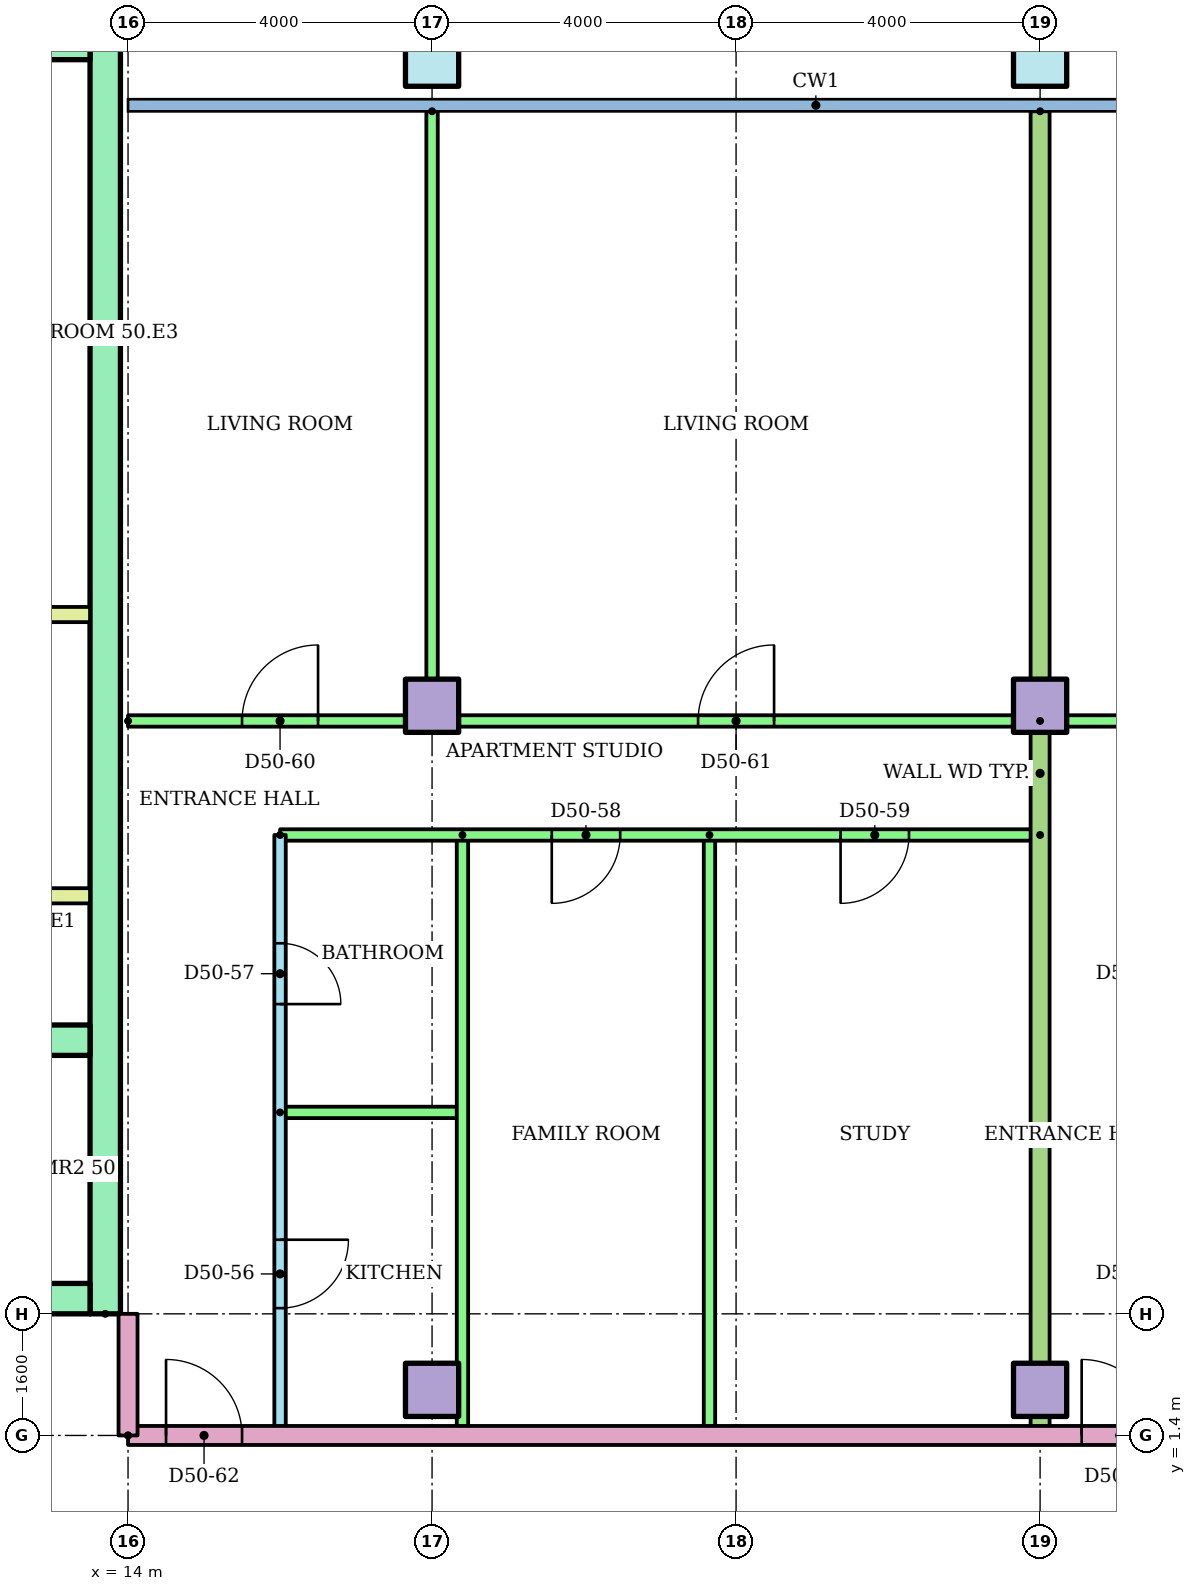
"""IFC4 building model, lengths in metres.
Left out: names, types, materials, properties, quantities, classifications, styles, units other than length and angle.
Written with IfcOpenShell. Run it as: python <this file> out.ifc"""

import sys

from ifc_helpers import new_model, si_unit, direction, frame, frame_2d, origin, origin_2d, place, context, subcontext, project, spatial, rectangle, hollow_rectangle, extrude, element, fill, save


model = new_model("IFC4")
c1 = context("Model", 3, precision=1e-05, world=origin(), true_north=direction((0.0, 1.0)))
c2 = subcontext(c1, "Body", "Model", "MODEL_VIEW")
j1 = project(units=[si_unit("LENGTHUNIT", "METRE"), si_unit("PLANEANGLEUNIT", "RADIAN")], contexts=[c1])
p1 = place(None, origin())
s1 = spatial("IfcSite", under=j1, at=p1, CompositionType="ELEMENT")
p2 = place(p1, origin())
s2 = spatial("IfcBuilding", under=s1, at=p2, CompositionType="ELEMENT")
p3 = place(p2, frame((0.0, 0.0, 190.9)))
s3 = spatial("IfcBuildingStorey", under=s2, at=p3, CompositionType="ELEMENT", Elevation=190.9)
for number, where in (
    (1, (18.0, 2.0, 0.0)),
    (2, (26.0, 2.0, 0.0)),
    (3, (18.0, 11.0, 0.0)),
    (4, (26.0, 11.0, 0.0)),
):
    element("IfcColumn", number, at=place(p3, frame(where)), inside=s3, PredefinedType="COLUMN", context=c2, shape_type="SweptSolid", body=[
        extrude(rectangle(XDim=0.7, YDim=0.7, at=origin_2d()), origin(), (0.0, 0.0, 1.0), 3.2),
    ])
for number, where in (
    (5, (18.0, 19.5, 0.0)),
    (6, (26.0, 19.5, 0.0)),
):
    element("IfcColumn", number, at=place(p3, frame(where)), inside=s3, PredefinedType="COLUMN", context=c2, shape_type="SweptSolid", body=[
        extrude(hollow_rectangle(XDim=0.7, YDim=0.7, WallThickness=0.036, at=origin_2d()), origin(), (0.0, 0.0, 1.0), 3.2),
    ])
p4 = place(p3, frame((13.7, 3.0, 0.0), z_axis=(0.0, 0.0, 1.0), x_axis=(0.0, 1.0, 0.0)))
e7 = element("IfcWall", 7, at=p4, inside=s3, PredefinedType="SHEAR", context=c2, shape_type="SweptSolid", body=[
    extrude(rectangle(XDim=17.0, YDim=0.4, at=frame_2d((8.5, 0.0))), origin(), (0.0, 0.0, 1.0), 2.8),
])
p5 = place(p3, frame((-13.5, 19.7, 0.0)))
e8 = element("IfcWall", 8, at=p5, inside=s3, PredefinedType="SHEAR", context=c2, shape_type="SweptSolid", body=[
    extrude(rectangle(XDim=27.0, YDim=0.4, at=frame_2d((13.5, 0.0))), origin(), (0.0, 0.0, 1.0), 2.8),
])
p6 = place(p3, frame((-13.5, 3.2, 0.0)))
e9 = element("IfcWall", 9, at=p6, inside=s3, PredefinedType="SHEAR", context=c2, shape_type="SweptSolid", body=[
    extrude(rectangle(XDim=27.0, YDim=0.4, at=frame_2d((13.5, 0.0))), origin(), (0.0, 0.0, 1.0), 2.8),
])
p7 = place(p6, frame((22.083, 0.0, 0.0)))
e10 = element("IfcOpeningElement", 10, at=p7, cuts=e9, PredefinedType="OPENING", context=c2, shape_type="SweptSolid", body=[
    extrude(rectangle(XDim=1.1, YDim=2.1, at=frame_2d((0.55, 1.05))), frame((0.0, 0.21, 0.0), z_axis=(0.0, -1.0, 0.0), x_axis=(1.0, 0.0, 0.0)), (0.0, 0.0, 1.0), 0.42),
])
p8 = place(p6, frame((25.128, 0.0, 0.0)))
e11 = element("IfcOpeningElement", 11, at=p8, cuts=e9, PredefinedType="OPENING", context=c2, shape_type="SweptSolid", body=[
    extrude(rectangle(XDim=1.1, YDim=2.1, at=frame_2d((0.55, 1.05))), frame((0.0, 0.21, 0.0), z_axis=(0.0, -1.0, 0.0), x_axis=(1.0, 0.0, 0.0)), (0.0, 0.0, 1.0), 0.42),
])
p9 = place(p6, frame((12.6, 0.0, 0.0)))
e12 = element("IfcOpeningElement", 12, at=p9, cuts=e9, PredefinedType="OPENING", context=c2, shape_type="SweptSolid", body=[
    extrude(rectangle(XDim=1.8, YDim=2.1, at=frame_2d((0.9, 1.05))), frame((0.0, 0.21, 0.0), z_axis=(0.0, -1.0, 0.0), x_axis=(1.0, 0.0, 0.0)), (0.0, 0.0, 1.0), 0.42),
])
p10 = place(p3, frame((1.522, 6.6, 0.0)))
e13 = element("IfcWall", 13, at=p10, inside=s3, PredefinedType="SHEAR", context=c2, shape_type="SweptSolid", body=[
    extrude(rectangle(XDim=11.978, YDim=0.4, at=frame_2d((5.989, 0.0))), origin(), (0.0, 0.0, 1.0), 2.8),
])
p11 = place(p10, frame((1.022, 0.0, 0.0)))
e14 = element("IfcOpeningElement", 14, at=p11, cuts=e13, PredefinedType="OPENING", context=c2, shape_type="SweptSolid", body=[
    extrude(rectangle(XDim=1.0, YDim=2.1, at=frame_2d((0.5, 1.05))), frame((0.0, 0.21, 0.0), z_axis=(0.0, -1.0, 0.0), x_axis=(1.0, 0.0, 0.0)), (0.0, 0.0, 1.0), 0.42),
])
p12 = place(p10, frame((4.067, 0.0, 0.0)))
e15 = element("IfcOpeningElement", 15, at=p12, cuts=e13, PredefinedType="OPENING", context=c2, shape_type="SweptSolid", body=[
    extrude(rectangle(XDim=1.0, YDim=2.1, at=frame_2d((0.5, 1.05))), frame((0.0, 0.21, 0.0), z_axis=(0.0, -1.0, 0.0), x_axis=(1.0, 0.0, 0.0)), (0.0, 0.0, 1.0), 0.42),
])
for number, where in (
    (16, (9.6, 8.5, 0.0)),
    (17, (9.6, 12.2, 0.0)),
):
    element("IfcWall", number, at=place(p3, frame(where)), inside=s3, PredefinedType="PARTITIONING", context=c2, shape_type="SweptSolid", body=[
        extrude(rectangle(XDim=3.9, YDim=0.2, at=frame_2d((1.95, 0.0))), origin(), (0.0, 0.0, 1.0), 2.8),
    ])
p13 = place(p3, frame((16.0, 9.3, 0.0), z_axis=(0.0, 0.0, 1.0), x_axis=(0.0, -1.0, 0.0)))
e18 = element("IfcWall", 18, at=p13, inside=s3, PredefinedType="PARTITIONING", context=c2, shape_type="SweptSolid", body=[
    extrude(rectangle(XDim=7.9, YDim=0.15, at=frame_2d((3.95, 0.0))), origin(), (0.0, 0.0, 1.0), 2.4),
])
p14 = place(p13, frame((5.325, 0.0, 0.0)))
e19 = element("IfcOpeningElement", 19, at=p14, cuts=e18, PredefinedType="OPENING", context=c2, shape_type="SweptSolid", body=[
    extrude(rectangle(XDim=0.9, YDim=2.1, at=frame_2d((0.45, 1.05))), frame((0.0, 0.085, 0.0), z_axis=(0.0, -1.0, 0.0), x_axis=(1.0, 0.0, 0.0)), (0.0, 0.0, 1.0), 0.17),
])
p15 = place(p13, frame((1.425, 0.0, 0.0)))
e20 = element("IfcOpeningElement", 20, at=p15, cuts=e18, PredefinedType="OPENING", context=c2, shape_type="SweptSolid", body=[
    extrude(rectangle(XDim=0.8, YDim=2.1, at=frame_2d((0.4, 1.05))), frame((0.0, 0.085, 0.0), z_axis=(0.0, -1.0, 0.0), x_axis=(1.0, 0.0, 0.0)), (0.0, 0.0, 1.0), 0.17),
])
p16 = place(p3, frame((16.0, 5.65, 0.0)))
e21 = element("IfcWall", 21, at=p16, inside=s3, PredefinedType="PARTITIONING", context=c2, shape_type="SweptSolid", body=[
    extrude(rectangle(XDim=2.4, YDim=0.15, at=frame_2d((1.2, 0.0))), origin(), (0.0, 0.0, 1.0), 2.4),
])
for number, where, z_axis, x_axis in (
    (22, (18.4, 9.3, 0.0), (0.0, 0.0, 1.0), (0.0, -1.0, 0.0)),
    (23, (21.65, 9.3, 0.0), (0.0, 0.0, 1.0), (0.0, -1.0, 0.0)),
):
    element("IfcWall", number, at=place(p3, frame(where, z_axis=z_axis, x_axis=x_axis)), inside=s3, PredefinedType="PARTITIONING", context=c2, shape_type="SweptSolid", body=[
        extrude(rectangle(XDim=7.9, YDim=0.15, at=frame_2d((3.95, 0.0))), origin(), (0.0, 0.0, 1.0), 2.4),
    ])
p17 = place(p3, frame((26.0, 9.3, 0.0), z_axis=(0.0, 0.0, 1.0), x_axis=(-1.0, 0.0, 0.0)))
e24 = element("IfcWall", 24, at=p17, inside=s3, PredefinedType="PARTITIONING", context=c2, shape_type="SweptSolid", body=[
    extrude(rectangle(XDim=10.0, YDim=0.15, at=frame_2d((5.0, 0.0))), origin(), (0.0, 0.0, 1.0), 2.4),
])
p18 = place(p17, frame((5.525, 0.0, 0.0)))
e25 = element("IfcOpeningElement", 25, at=p18, cuts=e24, PredefinedType="OPENING", context=c2, shape_type="SweptSolid", body=[
    extrude(rectangle(XDim=0.9, YDim=2.1, at=frame_2d((0.45, 1.05))), frame((0.0, 0.085, 0.0), z_axis=(0.0, -1.0, 0.0), x_axis=(1.0, 0.0, 0.0)), (0.0, 0.0, 1.0), 0.17),
])
p19 = place(p17, frame((1.725, 0.0, 0.0)))
e26 = element("IfcOpeningElement", 26, at=p19, cuts=e24, PredefinedType="OPENING", context=c2, shape_type="SweptSolid", body=[
    extrude(rectangle(XDim=0.9, YDim=2.1, at=frame_2d((0.45, 1.05))), frame((0.0, 0.085, 0.0), z_axis=(0.0, -1.0, 0.0), x_axis=(1.0, 0.0, 0.0)), (0.0, 0.0, 1.0), 0.17),
])
p20 = place(p3, frame((14.0, 10.8, 0.0)))
e27 = element("IfcWall", 27, at=p20, inside=s3, PredefinedType="PARTITIONING", context=c2, shape_type="SweptSolid", body=[
    extrude(rectangle(XDim=12.0, YDim=0.15, at=frame_2d((6.0, 0.0))), origin(), (0.0, 0.0, 1.0), 2.4),
])
p21 = place(p20, frame((1.5, 0.0, 0.0)))
e28 = element("IfcOpeningElement", 28, at=p21, cuts=e27, PredefinedType="OPENING", context=c2, shape_type="SweptSolid", body=[
    extrude(rectangle(XDim=1.0, YDim=2.1, at=frame_2d((0.5, 1.05))), frame((0.0, 0.085, 0.0), z_axis=(0.0, -1.0, 0.0), x_axis=(1.0, 0.0, 0.0)), (0.0, 0.0, 1.0), 0.17),
])
p22 = place(p20, frame((7.5, 0.0, 0.0)))
e29 = element("IfcOpeningElement", 29, at=p22, cuts=e27, PredefinedType="OPENING", context=c2, shape_type="SweptSolid", body=[
    extrude(rectangle(XDim=1.0, YDim=2.1, at=frame_2d((0.5, 1.05))), frame((0.0, 0.085, 0.0), z_axis=(0.0, -1.0, 0.0), x_axis=(1.0, 0.0, 0.0)), (0.0, 0.0, 1.0), 0.17),
])
p23 = place(p3, frame((18.0, 18.821, 0.0), z_axis=(0.0, 0.0, 1.0), x_axis=(0.0, -1.0, 0.0)))
e30 = element("IfcWall", 30, at=p23, inside=s3, PredefinedType="PARTITIONING", context=c2, shape_type="SweptSolid", body=[
    extrude(rectangle(XDim=8.021, YDim=0.15, at=frame_2d((4.01, 0.0))), origin(), (0.0, 0.0, 1.0), 2.4),
])
p24 = place(p3, frame((26.0, 10.8, 0.0)))
e31 = element("IfcWall", 31, at=p24, inside=s3, PredefinedType="PARTITIONING", context=c2, shape_type="SweptSolid", body=[
    extrude(rectangle(XDim=10.81, YDim=0.15, at=frame_2d((5.405, 0.0))), origin(), (0.0, 0.0, 1.0), 2.4),
])
p25 = place(p24, frame((2.55, 0.0, 0.0)))
e32 = element("IfcOpeningElement", 32, at=p25, cuts=e31, PredefinedType="OPENING", context=c2, shape_type="SweptSolid", body=[
    extrude(rectangle(XDim=1.0, YDim=2.1, at=frame_2d((0.5, 1.05))), frame((0.0, 0.085, 0.0), z_axis=(0.0, -1.0, 0.0), x_axis=(1.0, 0.0, 0.0)), (0.0, 0.0, 1.0), 0.17),
])
p26 = place(p24, frame((8.547, 0.0, 0.0)))
e33 = element("IfcOpeningElement", 33, at=p26, cuts=e31, PredefinedType="OPENING", context=c2, shape_type="SweptSolid", body=[
    extrude(rectangle(XDim=0.9, YDim=2.1, at=frame_2d((0.45, 1.05))), frame((0.0, 0.085, 0.0), z_axis=(0.0, -1.0, 0.0), x_axis=(1.0, 0.0, 0.0)), (0.0, 0.0, 1.0), 0.17),
])
p27 = place(p3, frame((26.0, 18.821, 0.0), z_axis=(0.0, 0.0, 1.0), x_axis=(0.0, -1.0, 0.0)))
e34 = element("IfcWall", 34, at=p27, inside=s3, PredefinedType="PARTITIONING", context=c2, shape_type="SweptSolid", body=[
    extrude(rectangle(XDim=17.421, YDim=0.25, at=frame_2d((8.71, 0.0))), origin(), (0.0, 0.0, 1.0), 2.4),
])
p28 = place(p3, frame((14.0, 1.4, 0.0)))
e35 = element("IfcWall", 35, at=p28, inside=s3, PredefinedType="PARTITIONING", context=c2, shape_type="SweptSolid", body=[
    extrude(rectangle(XDim=15.0, YDim=0.25, at=frame_2d((7.5, 0.0))), origin(), (0.0, 0.0, 1.0), 2.4),
])
p29 = place(p28, frame((0.5, 0.0, 0.0)))
e36 = element("IfcOpeningElement", 36, at=p29, cuts=e35, PredefinedType="OPENING", context=c2, shape_type="SweptSolid", body=[
    extrude(rectangle(XDim=1.0, YDim=2.1, at=frame_2d((0.5, 1.05))), frame((0.0, 0.135, 0.0), z_axis=(0.0, -1.0, 0.0), x_axis=(1.0, 0.0, 0.0)), (0.0, 0.0, 1.0), 0.27),
])
p30 = place(p28, frame((12.547, 0.0, 0.0)))
e37 = element("IfcOpeningElement", 37, at=p30, cuts=e35, PredefinedType="OPENING", context=c2, shape_type="SweptSolid", body=[
    extrude(rectangle(XDim=1.0, YDim=2.1, at=frame_2d((0.5, 1.05))), frame((0.0, 0.135, 0.0), z_axis=(0.0, -1.0, 0.0), x_axis=(1.0, 0.0, 0.0)), (0.0, 0.0, 1.0), 0.27),
])
p31 = place(p3, frame((14.0, 1.4, 0.0), z_axis=(0.0, 0.0, 1.0), x_axis=(0.0, 1.0, 0.0)))
e38 = element("IfcWall", 38, at=p31, inside=s3, PredefinedType="PARTITIONING", context=c2, shape_type="SweptSolid", body=[
    extrude(rectangle(XDim=1.6, YDim=0.25, at=frame_2d((0.8, 0.0))), origin(), (0.0, 0.0, 1.0), 2.4),
])
p32 = place(p14, origin())
e39 = element("IfcDoor", 39, at=p32, inside=s3, OperationType="SINGLE_SWING_LEFT", PredefinedType="DOOR", context=c2, shape_type="SweptSolid", body=[
    extrude(rectangle(XDim=0.9, YDim=2.1, at=frame_2d((0.45, 1.05))), frame((0.0, 0.025, 0.0), z_axis=(0.0, -1.0, 0.0), x_axis=(1.0, 0.0, 0.0)), (0.0, 0.0, 1.0), 0.05),
])
fill(e19, e39)
p33 = place(p15, origin())
e40 = element("IfcDoor", 40, at=p33, inside=s3, OperationType="SINGLE_SWING_RIGHT", PredefinedType="DOOR", context=c2, shape_type="SweptSolid", body=[
    extrude(rectangle(XDim=0.8, YDim=2.1, at=frame_2d((0.4, 1.05))), frame((0.0, 0.025, 0.0), z_axis=(0.0, -1.0, 0.0), x_axis=(1.0, 0.0, 0.0)), (0.0, 0.0, 1.0), 0.05),
])
fill(e20, e40)
p34 = place(p18, origin())
e41 = element("IfcDoor", 41, at=p34, inside=s3, OperationType="SINGLE_SWING_RIGHT", PredefinedType="DOOR", context=c2, shape_type="SweptSolid", body=[
    extrude(rectangle(XDim=0.9, YDim=2.1, at=frame_2d((0.45, 1.05))), frame((0.0, 0.025, 0.0), z_axis=(0.0, -1.0, 0.0), x_axis=(1.0, 0.0, 0.0)), (0.0, 0.0, 1.0), 0.05),
])
fill(e25, e41)
p35 = place(p19, origin())
e42 = element("IfcDoor", 42, at=p35, inside=s3, OperationType="SINGLE_SWING_RIGHT", PredefinedType="DOOR", context=c2, shape_type="SweptSolid", body=[
    extrude(rectangle(XDim=0.9, YDim=2.1, at=frame_2d((0.45, 1.05))), frame((0.0, 0.025, 0.0), z_axis=(0.0, -1.0, 0.0), x_axis=(1.0, 0.0, 0.0)), (0.0, 0.0, 1.0), 0.05),
])
fill(e26, e42)
p36 = place(p21, origin())
e43 = element("IfcDoor", 43, at=p36, inside=s3, OperationType="SINGLE_SWING_RIGHT", PredefinedType="DOOR", context=c2, shape_type="SweptSolid", body=[
    extrude(rectangle(XDim=1.0, YDim=2.1, at=frame_2d((0.5, 1.05))), frame((0.0, 0.025, 0.0), z_axis=(0.0, -1.0, 0.0), x_axis=(1.0, 0.0, 0.0)), (0.0, 0.0, 1.0), 0.05),
])
fill(e28, e43)
p37 = place(p22, origin())
e44 = element("IfcDoor", 44, at=p37, inside=s3, OperationType="SINGLE_SWING_RIGHT", PredefinedType="DOOR", context=c2, shape_type="SweptSolid", body=[
    extrude(rectangle(XDim=1.0, YDim=2.1, at=frame_2d((0.5, 1.05))), frame((0.0, 0.025, 0.0), z_axis=(0.0, -1.0, 0.0), x_axis=(1.0, 0.0, 0.0)), (0.0, 0.0, 1.0), 0.05),
])
fill(e29, e44)
p38 = place(p29, origin())
e45 = element("IfcDoor", 45, at=p38, inside=s3, OperationType="SINGLE_SWING_LEFT", PredefinedType="DOOR", context=c2, shape_type="SweptSolid", body=[
    extrude(rectangle(XDim=1.0, YDim=2.1, at=frame_2d((0.5, 1.05))), frame((0.0, 0.025, 0.0), z_axis=(0.0, -1.0, 0.0), x_axis=(1.0, 0.0, 0.0)), (0.0, 0.0, 1.0), 0.05),
])
fill(e36, e45)
p39 = place(p30, origin())
e46 = element("IfcDoor", 46, at=p39, inside=s3, OperationType="SINGLE_SWING_LEFT", PredefinedType="DOOR", context=c2, shape_type="SweptSolid", body=[
    extrude(rectangle(XDim=1.0, YDim=2.1, at=frame_2d((0.5, 1.05))), frame((0.0, 0.025, 0.0), z_axis=(0.0, -1.0, 0.0), x_axis=(1.0, 0.0, 0.0)), (0.0, 0.0, 1.0), 0.05),
])
fill(e37, e46)
save(model, sys.argv[1])
